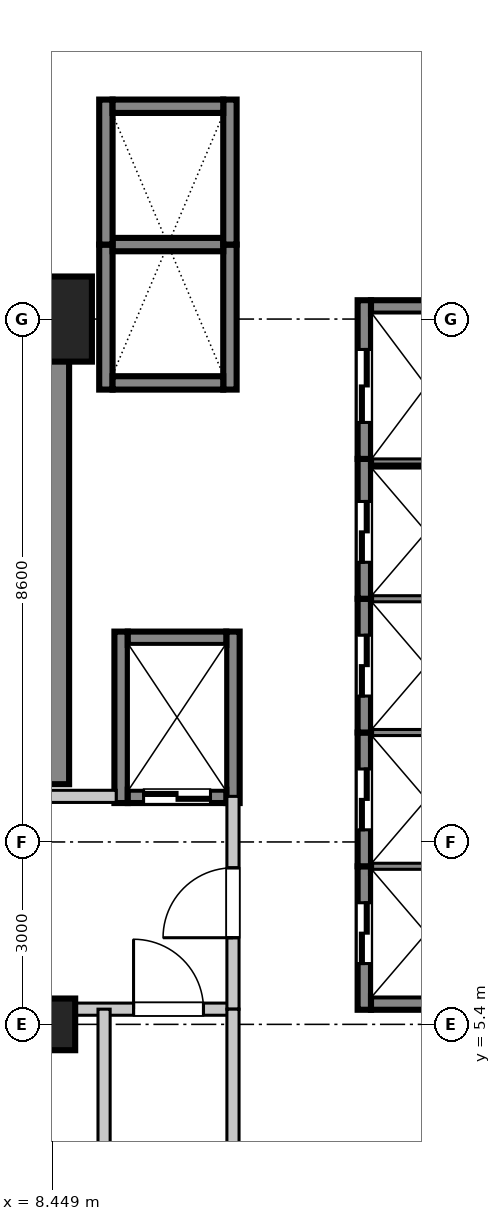
"""IFC4 building model, lengths in metres.
Left out: names, types, materials, properties, quantities, classifications, styles, units other than length and angle.
Written with IfcOpenShell. Run it as: python <this file> out.ifc"""

import sys

from ifc_helpers import new_model, si_unit, direction, frame, frame_2d, origin, origin_2d, place, context, subcontext, project, spatial, rectangle, extrude, source, transform, mapped, element, fill, save


model = new_model("IFC4")
c1 = context("Model", 3, precision=1e-05, world=origin(), true_north=direction((0.0, 1.0)))
c2 = subcontext(c1, "Body", "Model", "MODEL_VIEW")
j1 = project(units=[si_unit("LENGTHUNIT", "METRE"), si_unit("PLANEANGLEUNIT", "RADIAN")], contexts=[c1])
p1 = place(None, origin())
s1 = spatial("IfcSite", under=j1, at=p1, CompositionType="ELEMENT")
p2 = place(p1, origin())
s2 = spatial("IfcBuilding", under=s1, at=p2, CompositionType="ELEMENT")
p3 = place(p2, frame((0.0, 0.0, 83.5)))
s3 = spatial("IfcBuildingStorey", under=s2, at=p3, CompositionType="ELEMENT", Elevation=83.5)
m1 = source(origin(), c2, "Body", "SweptSolid", [
    extrude(rectangle(XDim=0.85, YDim=0.85, at=origin_2d()), origin(), (0.0, 0.0, 1.0), 4.755),
])
p4 = place(p3, frame((8.4, 5.4, 0.0), z_axis=(0.0, 0.0, 1.0), x_axis=(1.0, 0.0, 0.0)))
e1 = element("IfcColumn", 1, at=p4, inside=s3, PredefinedType="PILASTER", context=c2, shape_type="MappedRepresentation", body=[
    mapped(m1, transform((0.0, 0.0, 0.0), scale=1.0)),
])
m2 = source(origin(), c2, "Body", "SweptSolid", [
    extrude(rectangle(XDim=1.4, YDim=1.4, at=origin_2d()), origin(), (0.0, 0.0, 1.0), 4.755),
])
p5 = place(p3, frame((8.4, 17.0, 0.0), z_axis=(0.0, 0.0, 1.0), x_axis=(1.0, 0.0, 0.0)))
e2 = element("IfcColumn", 2, at=p5, inside=s3, PredefinedType="COLUMN", context=c2, shape_type="MappedRepresentation", body=[
    mapped(m2, transform((0.0, 0.0, 0.0), scale=1.0)),
])
m3 = source(origin(), c2, "Body", "SweptSolid", [
    extrude(rectangle(XDim=7.65, YDim=0.65, at=frame_2d((3.825, 0.0))), origin(), (0.0, 0.0, 1.0), 4.53),
])
p6 = place(p3, frame((8.4, 9.35, 0.0), z_axis=(0.0, 0.0, 1.0), x_axis=(0.0, 1.0, 0.0)))
e3 = element("IfcWall", 3, at=p6, inside=s3, PredefinedType="SHEAR", context=c2, shape_type="MappedRepresentation", body=[
    mapped(m3, transform((0.0, 0.0, 0.0), scale=1.0)),
])
m4 = source(origin(), c2, "Body", "SweptSolid", [
    extrude(rectangle(XDim=2.36, YDim=0.22, at=frame_2d((1.18, 0.0))), origin(), (0.0, 0.0, 1.0), 4.53),
])
p7 = place(p3, frame((13.58, 5.64, 0.0), z_axis=(0.0, 0.0, 1.0), x_axis=(0.0, 1.0, 0.0)))
e4 = element("IfcWall", 4, at=p7, inside=s3, PredefinedType="SHEAR", context=c2, shape_type="MappedRepresentation", body=[
    mapped(m4, transform((0.0, 0.0, 0.0), scale=1.0)),
])
p8 = place(p7, frame((0.76, 0.0, 0.0)))
e5 = element("IfcOpeningElement", 5, at=p8, cuts=e4, PredefinedType="OPENING", context=c2, shape_type="SweptSolid", body=[
    extrude(rectangle(XDim=1.0, YDim=2.2, at=frame_2d((0.5, 1.1))), frame((0.0, 0.12, 0.0), z_axis=(0.0, -1.0, 0.0), x_axis=(1.0, 0.0, 0.0)), (0.0, 0.0, 1.0), 0.24),
])
m5 = source(origin(), c2, "Body", "SweptSolid", [
    extrude(rectangle(XDim=1.82, YDim=0.22, at=frame_2d((0.91, 0.0))), origin(), (0.0, 0.0, 1.0), 4.53),
])
p9 = place(p3, frame((13.69, 5.75, 0.0), z_axis=(0.0, 0.0, 1.0), x_axis=(1.0, 0.0, 0.0)))
e6 = element("IfcWall", 6, at=p9, inside=s3, PredefinedType="SHEAR", context=c2, shape_type="MappedRepresentation", body=[
    mapped(m5, transform((0.0, 0.0, 0.0), scale=1.0)),
])
m6 = source(origin(), c2, "Body", "SweptSolid", [
    extrude(rectangle(XDim=1.82, YDim=0.22, at=frame_2d((0.91, 0.0))), origin(), (0.0, 0.0, 1.0), 4.8),
])
p10 = place(p3, frame((13.69, 8.0, 0.0), z_axis=(0.0, 0.0, 1.0), x_axis=(1.0, 0.0, 0.0)))
e7 = element("IfcWall", 7, at=p10, inside=s3, PredefinedType="SHEAR", context=c2, shape_type="MappedRepresentation", body=[
    mapped(m6, transform((0.0, 0.0, 0.0), scale=1.0)),
])
m7 = source(origin(), c2, "Body", "SweptSolid", [
    extrude(rectangle(XDim=2.2, YDim=0.22, at=frame_2d((1.1, 0.0))), origin(), (0.0, 0.0, 1.0), 4.53),
])
p11 = place(p3, frame((13.58, 8.0, 0.0), z_axis=(0.0, 0.0, 1.0), x_axis=(0.0, 1.0, 0.0)))
e8 = element("IfcWall", 8, at=p11, inside=s3, PredefinedType="SHEAR", context=c2, shape_type="MappedRepresentation", body=[
    mapped(m7, transform((0.0, 0.0, 0.0), scale=1.0)),
])
p12 = place(p11, frame((0.6, 0.0, 0.0)))
e9 = element("IfcOpeningElement", 9, at=p12, cuts=e8, PredefinedType="OPENING", context=c2, shape_type="SweptSolid", body=[
    extrude(rectangle(XDim=1.0, YDim=2.2, at=frame_2d((0.5, 1.1))), frame((0.0, 0.12, 0.0), z_axis=(0.0, -1.0, 0.0), x_axis=(1.0, 0.0, 0.0)), (0.0, 0.0, 1.0), 0.24),
])
p13 = place(p3, frame((13.69, 10.2, 0.0), z_axis=(0.0, 0.0, 1.0), x_axis=(1.0, 0.0, 0.0)))
e10 = element("IfcWall", 10, at=p13, inside=s3, PredefinedType="SHEAR", context=c2, shape_type="MappedRepresentation", body=[
    mapped(m6, transform((0.0, 0.0, 0.0), scale=1.0)),
])
p14 = place(p3, frame((13.58, 10.2, 0.0), z_axis=(0.0, 0.0, 1.0), x_axis=(0.0, 1.0, 0.0)))
e11 = element("IfcWall", 11, at=p14, inside=s3, PredefinedType="SHEAR", context=c2, shape_type="MappedRepresentation", body=[
    mapped(m7, transform((0.0, 0.0, 0.0), scale=1.0)),
])
p15 = place(p14, frame((0.6, 0.0, 0.0)))
e12 = element("IfcOpeningElement", 12, at=p15, cuts=e11, PredefinedType="OPENING", context=c2, shape_type="SweptSolid", body=[
    extrude(rectangle(XDim=1.0, YDim=2.2, at=frame_2d((0.5, 1.1))), frame((0.0, 0.12, 0.0), z_axis=(0.0, -1.0, 0.0), x_axis=(1.0, 0.0, 0.0)), (0.0, 0.0, 1.0), 0.24),
])
p16 = place(p3, frame((13.69, 12.4, 0.0), z_axis=(0.0, 0.0, 1.0), x_axis=(1.0, 0.0, 0.0)))
e13 = element("IfcWall", 13, at=p16, inside=s3, PredefinedType="SHEAR", context=c2, shape_type="MappedRepresentation", body=[
    mapped(m6, transform((0.0, 0.0, 0.0), scale=1.0)),
])
m8 = source(origin(), c2, "Body", "SweptSolid", [
    extrude(rectangle(XDim=2.3, YDim=0.22, at=frame_2d((1.15, 0.0))), origin(), (0.0, 0.0, 1.0), 4.53),
])
p17 = place(p3, frame((13.58, 12.4, 0.0), z_axis=(0.0, 0.0, 1.0), x_axis=(0.0, 1.0, 0.0)))
e14 = element("IfcWall", 14, at=p17, inside=s3, PredefinedType="SHEAR", context=c2, shape_type="MappedRepresentation", body=[
    mapped(m8, transform((0.0, 0.0, 0.0), scale=1.0)),
])
p18 = place(p17, frame((0.6, 0.0, 0.0)))
e15 = element("IfcOpeningElement", 15, at=p18, cuts=e14, PredefinedType="OPENING", context=c2, shape_type="SweptSolid", body=[
    extrude(rectangle(XDim=1.0, YDim=2.2, at=frame_2d((0.5, 1.1))), frame((0.0, 0.12, 0.0), z_axis=(0.0, -1.0, 0.0), x_axis=(1.0, 0.0, 0.0)), (0.0, 0.0, 1.0), 0.24),
])
p19 = place(p3, frame((13.69, 14.7, 0.0), z_axis=(0.0, 0.0, 1.0), x_axis=(1.0, 0.0, 0.0)))
e16 = element("IfcWall", 16, at=p19, inside=s3, PredefinedType="SHEAR", context=c2, shape_type="MappedRepresentation", body=[
    mapped(m6, transform((0.0, 0.0, 0.0), scale=1.0)),
])
m9 = source(origin(), c2, "Body", "SweptSolid", [
    extrude(rectangle(XDim=2.385, YDim=0.22, at=frame_2d((1.192, 0.0))), origin(), (0.0, 0.0, 1.0), 4.53),
])
for number, where, z_axis, x_axis in (
    (17, (9.33, 15.84, 0.0), (0.0, 0.0, 1.0), (0.0, 1.0, 0.0)),
    (18, (11.37, 15.84, 0.0), (0.0, 0.0, 1.0), (0.0, 1.0, 0.0)),
):
    element("IfcWall", number, at=place(p3, frame(where, z_axis=z_axis, x_axis=x_axis)), inside=s3, PredefinedType="SHEAR", context=c2, shape_type="MappedRepresentation", body=[
        mapped(m9, transform((0.0, 0.0, 0.0), scale=1.0)),
    ])
p20 = place(p3, frame((9.44, 15.95, 0.0), z_axis=(0.0, 0.0, 1.0), x_axis=(1.0, 0.0, 0.0)))
e19 = element("IfcWall", 19, at=p20, inside=s3, PredefinedType="SHEAR", context=c2, shape_type="MappedRepresentation", body=[
    mapped(m5, transform((0.0, 0.0, 0.0), scale=1.0)),
])
p21 = place(p3, frame((9.44, 18.225, 0.0), z_axis=(0.0, 0.0, 1.0), x_axis=(1.0, 0.0, 0.0)))
e20 = element("IfcWall", 20, at=p21, inside=s3, PredefinedType="SHEAR", context=c2, shape_type="MappedRepresentation", body=[
    mapped(m6, transform((0.0, 0.0, 0.0), scale=1.0)),
])
for number, where, z_axis, x_axis in (
    (21, (9.33, 18.225, 0.0), (0.0, 0.0, 1.0), (0.0, 1.0, 0.0)),
    (22, (11.37, 18.225, 0.0), (0.0, 0.0, 1.0), (0.0, 1.0, 0.0)),
):
    element("IfcWall", number, at=place(p3, frame(where, z_axis=z_axis, x_axis=x_axis)), inside=s3, PredefinedType="SHEAR", context=c2, shape_type="MappedRepresentation", body=[
        mapped(m9, transform((0.0, 0.0, 0.0), scale=1.0)),
    ])
p22 = place(p3, frame((9.44, 20.5, 0.0), z_axis=(0.0, 0.0, 1.0), x_axis=(1.0, 0.0, 0.0)))
e23 = element("IfcWall", 23, at=p22, inside=s3, PredefinedType="SHEAR", context=c2, shape_type="MappedRepresentation", body=[
    mapped(m5, transform((0.0, 0.0, 0.0), scale=1.0)),
])
m10 = source(origin(), c2, "Body", "SweptSolid", [
    extrude(rectangle(XDim=2.82, YDim=0.22, at=frame_2d((1.41, 0.0))), origin(), (0.0, 0.0, 1.0), 4.53),
])
for number, where, z_axis, x_axis in (
    (24, (9.58, 9.04, 0.0), (0.0, 0.0, 1.0), (0.0, 1.0, 0.0)),
    (25, (11.42, 9.04, 0.0), (0.0, 0.0, 1.0), (0.0, 1.0, 0.0)),
):
    element("IfcWall", number, at=place(p3, frame(where, z_axis=z_axis, x_axis=x_axis)), inside=s3, PredefinedType="SHEAR", context=c2, shape_type="MappedRepresentation", body=[
        mapped(m10, transform((0.0, 0.0, 0.0), scale=1.0)),
    ])
m11 = source(origin(), c2, "Body", "SweptSolid", [
    extrude(rectangle(XDim=1.62, YDim=0.22, at=frame_2d((0.81, 0.0))), origin(), (0.0, 0.0, 1.0), 4.53),
])
p23 = place(p3, frame((9.69, 9.15, 0.0), z_axis=(0.0, 0.0, 1.0), x_axis=(1.0, 0.0, 0.0)))
e26 = element("IfcWall", 26, at=p23, inside=s3, PredefinedType="SHEAR", context=c2, shape_type="MappedRepresentation", body=[
    mapped(m11, transform((0.0, 0.0, 0.0), scale=1.0)),
])
p24 = place(p23, frame((0.26, 0.0, 0.0)))
e27 = element("IfcOpeningElement", 27, at=p24, cuts=e26, PredefinedType="OPENING", context=c2, shape_type="SweptSolid", body=[
    extrude(rectangle(XDim=1.1, YDim=2.2, at=frame_2d((0.55, 1.1))), frame((0.0, 0.12, 0.0), z_axis=(0.0, -1.0, 0.0), x_axis=(1.0, 0.0, 0.0)), (0.0, 0.0, 1.0), 0.24),
])
p25 = place(p3, frame((9.69, 11.75, 0.0), z_axis=(0.0, 0.0, 1.0), x_axis=(1.0, 0.0, 0.0)))
e28 = element("IfcWall", 28, at=p25, inside=s3, PredefinedType="SHEAR", context=c2, shape_type="MappedRepresentation", body=[
    mapped(m11, transform((0.0, 0.0, 0.0), scale=1.0)),
])
m12 = source(origin(), c2, "Body", "SweptSolid", [
    extrude(rectangle(XDim=2.61, YDim=0.22, at=frame_2d((1.305, 0.0))), origin(), (0.0, 0.0, 1.0), 4.53),
])
p26 = place(p3, frame((13.58, 14.7, 0.0), z_axis=(0.0, 0.0, 1.0), x_axis=(0.0, 1.0, 0.0)))
e29 = element("IfcWall", 29, at=p26, inside=s3, PredefinedType="SHEAR", context=c2, shape_type="MappedRepresentation", body=[
    mapped(m12, transform((0.0, 0.0, 0.0), scale=1.0)),
])
p27 = place(p26, frame((0.6, 0.0, 0.0)))
e30 = element("IfcOpeningElement", 30, at=p27, cuts=e29, PredefinedType="OPENING", context=c2, shape_type="SweptSolid", body=[
    extrude(rectangle(XDim=1.2, YDim=2.2, at=frame_2d((0.6, 1.1))), frame((0.0, 0.12, 0.0), z_axis=(0.0, -1.0, 0.0), x_axis=(1.0, 0.0, 0.0)), (0.0, 0.0, 1.0), 0.24),
])
p28 = place(p3, frame((13.69, 17.2, 0.0), z_axis=(0.0, 0.0, 1.0), x_axis=(1.0, 0.0, 0.0)))
e31 = element("IfcWall", 31, at=p28, inside=s3, PredefinedType="SHEAR", context=c2, shape_type="MappedRepresentation", body=[
    mapped(m5, transform((0.0, 0.0, 0.0), scale=1.0)),
])
m13 = source(origin(), c2, "Body", "SweptSolid", [
    extrude(rectangle(XDim=3.82, YDim=0.2, at=frame_2d((1.91, 0.0))), origin(), (0.0, 0.0, 1.0), 3.4),
])
p29 = place(p3, frame((7.6, 5.65, 0.0), z_axis=(0.0, 0.0, 1.0), x_axis=(1.0, 0.0, 0.0)))
e32 = element("IfcWall", 32, at=p29, inside=s3, PredefinedType="PARTITIONING", context=c2, shape_type="MappedRepresentation", body=[
    mapped(m13, transform((0.0, 0.0, 0.0), scale=1.0)),
])
p30 = place(p29, frame((2.185, 0.0, 0.0)))
e33 = element("IfcOpeningElement", 33, at=p30, cuts=e32, PredefinedType="OPENING", context=c2, shape_type="SweptSolid", body=[
    extrude(rectangle(XDim=1.15, YDim=2.15, at=frame_2d((0.575, 1.075))), frame((0.0, 0.11, 0.0), z_axis=(0.0, -1.0, 0.0), x_axis=(1.0, 0.0, 0.0)), (0.0, 0.0, 1.0), 0.22),
])
m14 = source(origin(), c2, "Body", "SweptSolid", [
    extrude(rectangle(XDim=1.9, YDim=0.2, at=frame_2d((0.95, 0.0))), origin(), (0.0, 0.0, 1.0), 3.4),
])
p31 = place(p3, frame((7.6, 9.15, 0.0), z_axis=(0.0, 0.0, 1.0), x_axis=(1.0, 0.0, 0.0)))
e34 = element("IfcWall", 34, at=p31, inside=s3, PredefinedType="PARTITIONING", context=c2, shape_type="MappedRepresentation", body=[
    mapped(m14, transform((0.0, 0.0, 0.0), scale=1.0)),
])
m15 = source(origin(), c2, "Body", "SweptSolid", [
    extrude(rectangle(XDim=3.5, YDim=0.2, at=frame_2d((1.75, 0.0))), origin(), (0.0, 0.0, 1.0), 3.4),
])
p32 = place(p3, frame((11.42, 5.65, 0.0), z_axis=(0.0, 0.0, 1.0), x_axis=(0.0, 1.0, 0.0)))
e35 = element("IfcWall", 35, at=p32, inside=s3, PredefinedType="PARTITIONING", context=c2, shape_type="MappedRepresentation", body=[
    mapped(m15, transform((0.0, 0.0, 0.0), scale=1.0)),
])
p33 = place(p32, frame((1.175, 0.0, 0.0)))
e36 = element("IfcOpeningElement", 36, at=p33, cuts=e35, PredefinedType="OPENING", context=c2, shape_type="SweptSolid", body=[
    extrude(rectangle(XDim=1.15, YDim=2.15, at=frame_2d((0.575, 1.075))), frame((0.0, 0.11, 0.0), z_axis=(0.0, -1.0, 0.0), x_axis=(1.0, 0.0, 0.0)), (0.0, 0.0, 1.0), 0.22),
])
m16 = source(origin(), c2, "Body", "SweptSolid", [
    extrude(rectangle(XDim=3.05, YDim=0.2, at=frame_2d((1.525, 0.0))), origin(), (0.0, 0.0, 1.0), 3.4),
])
for number, where, z_axis, x_axis in (
    (37, (9.3, 2.6, 0.0), (0.0, 0.0, 1.0), (0.0, 1.0, 0.0)),
    (38, (11.42, 2.6, 0.0), (0.0, 0.0, 1.0), (0.0, 1.0, 0.0)),
):
    element("IfcWall", number, at=place(p3, frame(where, z_axis=z_axis, x_axis=x_axis)), inside=s3, PredefinedType="PARTITIONING", context=c2, shape_type="MappedRepresentation", body=[
        mapped(m16, transform((0.0, 0.0, 0.0), scale=1.0)),
    ])
m17 = source(origin(), c2, "Body", "SweptSolid", [
    extrude(rectangle(XDim=1.0, YDim=2.2, at=frame_2d((0.5, 1.1))), frame((0.0, 0.025, 0.0), z_axis=(0.0, -1.0, 0.0), x_axis=(1.0, 0.0, 0.0)), (0.0, 0.0, 1.0), 0.05),
])
p34 = place(p8, origin())
e39 = element("IfcDoor", 39, at=p34, inside=s3, OperationType="DOUBLE_DOOR_SLIDING", PredefinedType="DOOR", context=c2, shape_type="MappedRepresentation", body=[
    mapped(m17, transform((0.0, 0.0, 0.0), scale=1.0)),
])
fill(e5, e39)
p35 = place(p12, origin())
e40 = element("IfcDoor", 40, at=p35, inside=s3, OperationType="DOUBLE_DOOR_SLIDING", PredefinedType="DOOR", context=c2, shape_type="MappedRepresentation", body=[
    mapped(m17, transform((0.0, 0.0, 0.0), scale=1.0)),
])
fill(e9, e40)
p36 = place(p15, origin())
e41 = element("IfcDoor", 41, at=p36, inside=s3, OperationType="DOUBLE_DOOR_SLIDING", PredefinedType="DOOR", context=c2, shape_type="MappedRepresentation", body=[
    mapped(m17, transform((0.0, 0.0, 0.0), scale=1.0)),
])
fill(e12, e41)
p37 = place(p18, origin())
e42 = element("IfcDoor", 42, at=p37, inside=s3, OperationType="DOUBLE_DOOR_SLIDING", PredefinedType="DOOR", context=c2, shape_type="MappedRepresentation", body=[
    mapped(m17, transform((0.0, 0.0, 0.0), scale=1.0)),
])
fill(e15, e42)
m18 = source(origin(), c2, "Body", "SweptSolid", [
    extrude(rectangle(XDim=1.1, YDim=2.2, at=frame_2d((0.55, 1.1))), frame((0.0, 0.025, 0.0), z_axis=(0.0, -1.0, 0.0), x_axis=(1.0, 0.0, 0.0)), (0.0, 0.0, 1.0), 0.05),
])
p38 = place(p24, frame((1.1, 0.0, 0.0), z_axis=(0.0, 0.0, 1.0), x_axis=(-1.0, 0.0, 0.0)))
e43 = element("IfcDoor", 43, at=p38, inside=s3, OperationType="DOUBLE_DOOR_SLIDING", PredefinedType="DOOR", context=c2, shape_type="MappedRepresentation", body=[
    mapped(m18, transform((0.0, 0.0, 0.0), scale=1.0)),
])
fill(e27, e43)
m19 = source(origin(), c2, "Body", "SweptSolid", [
    extrude(rectangle(XDim=1.2, YDim=2.2, at=frame_2d((0.6, 1.1))), frame((0.0, 0.025, 0.0), z_axis=(0.0, -1.0, 0.0), x_axis=(1.0, 0.0, 0.0)), (0.0, 0.0, 1.0), 0.05),
])
p39 = place(p27, origin())
e44 = element("IfcDoor", 44, at=p39, inside=s3, OperationType="DOUBLE_DOOR_SLIDING", PredefinedType="DOOR", context=c2, shape_type="MappedRepresentation", body=[
    mapped(m19, transform((0.0, 0.0, 0.0), scale=1.0)),
])
fill(e30, e44)
m20 = source(origin(), c2, "Body", "SweptSolid", [
    extrude(rectangle(XDim=1.15, YDim=2.15, at=frame_2d((0.575, 1.075))), frame((0.0, 0.025, 0.0), z_axis=(0.0, -1.0, 0.0), x_axis=(1.0, 0.0, 0.0)), (0.0, 0.0, 1.0), 0.05),
])
p40 = place(p33, frame((1.15, 0.0, 0.0), z_axis=(0.0, 0.0, 1.0), x_axis=(-1.0, 0.0, 0.0)))
e45 = element("IfcDoor", 45, at=p40, inside=s3, OperationType="SINGLE_SWING_LEFT", PredefinedType="DOOR", context=c2, shape_type="MappedRepresentation", body=[
    mapped(m20, transform((0.0, 0.0, 0.0), scale=1.0)),
])
fill(e36, e45)
p41 = place(p30, frame((1.15, 0.0, 0.0), z_axis=(0.0, 0.0, 1.0), x_axis=(-1.0, 0.0, 0.0)))
e46 = element("IfcDoor", 46, at=p41, inside=s3, OperationType="SINGLE_SWING_LEFT", PredefinedType="DOOR", context=c2, shape_type="MappedRepresentation", body=[
    mapped(m20, transform((0.0, 0.0, 0.0), scale=1.0)),
])
fill(e33, e46)
save(model, sys.argv[1])
